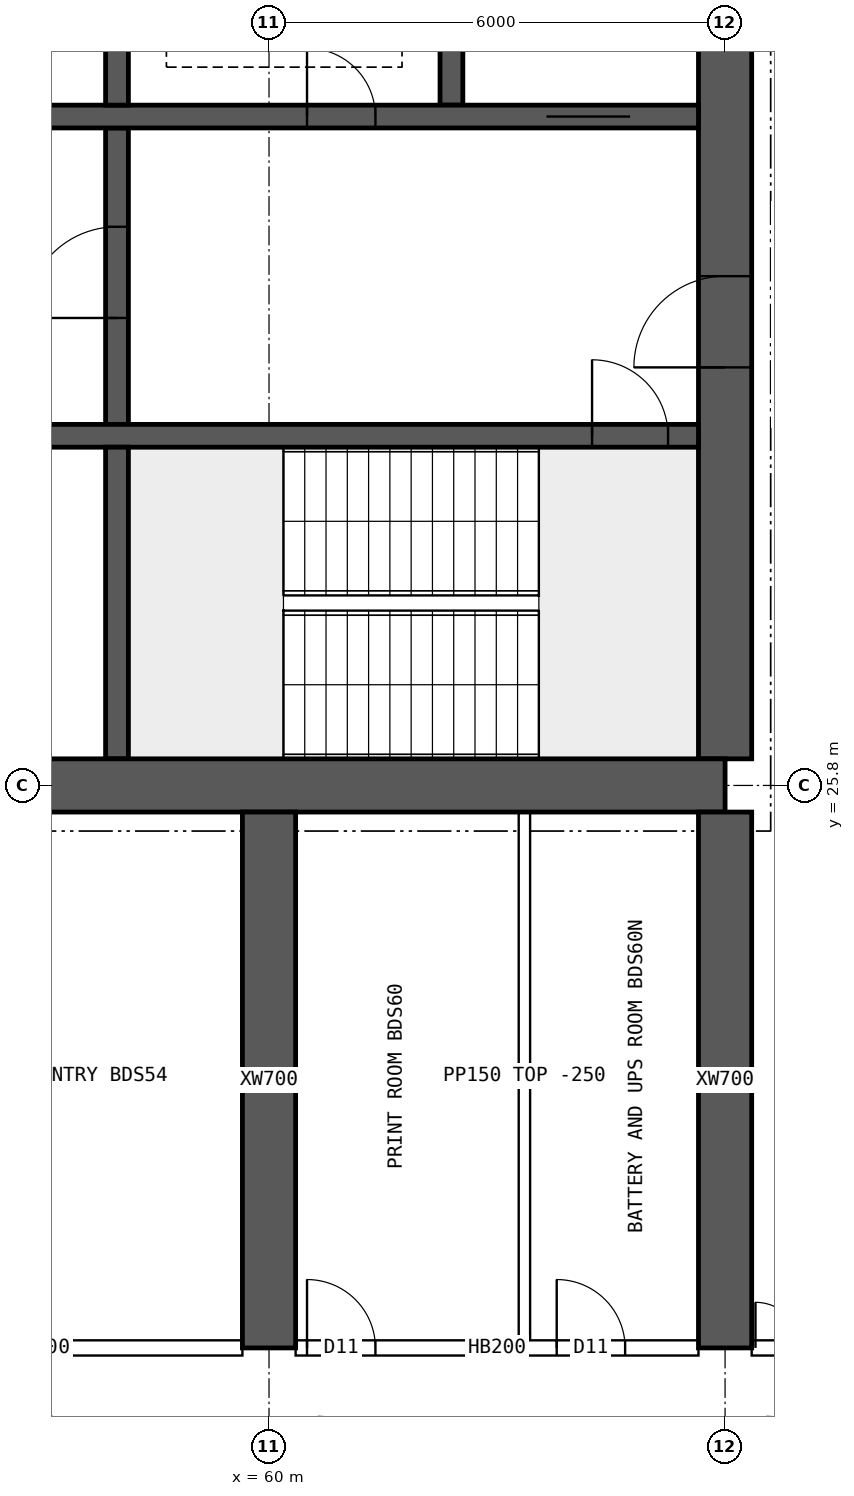
"""IFC4 building model, lengths in metres.
Left out: names, types, materials, properties, quantities, classifications, styles, units other than length and angle.
Written with IfcOpenShell. Run it as: python <this file> out.ifc"""

import sys

from ifc_helpers import new_model, si_unit, direction, frame, frame_2d, origin, place, context, subcontext, project, spatial, rectangle, extrude, element, fill, save


model = new_model("IFC4")
c1 = context("Model", 3, precision=1e-05, world=origin(), true_north=direction((0.0, 1.0)))
c2 = subcontext(c1, "Body", "Model", "MODEL_VIEW")
j1 = project(units=[si_unit("LENGTHUNIT", "METRE"), si_unit("PLANEANGLEUNIT", "RADIAN")], contexts=[c1])
p1 = place(None, origin())
s1 = spatial("IfcSite", under=j1, at=p1, CompositionType="ELEMENT")
p2 = place(p1, origin())
s2 = spatial("IfcBuilding", under=s1, at=p2, CompositionType="ELEMENT")
p3 = place(p2, frame((0.0, 0.0, 208.3)))
s3 = spatial("IfcBuildingStorey", under=s2, at=p3, CompositionType="ELEMENT", Elevation=208.3)
p4 = place(p3, frame((18.0, 25.8, 0.0), z_axis=(0.0, 0.0, 1.0), x_axis=(1.0, 0.0, 0.0)))
e1 = element("IfcWall", 1, at=p4, inside=s3, PredefinedType="SHEAR", context=c2, shape_type="SweptSolid", body=[
    extrude(rectangle(XDim=48.0, YDim=0.7, at=frame_2d((24.0, 0.0))), origin(), (0.0, 0.0, 1.0), 4.5),
])
p5 = place(p3, frame((66.0, 26.15, 0.0), z_axis=(0.0, 0.0, 1.0), x_axis=(0.0, 1.0, 0.0)))
e2 = element("IfcWall", 2, at=p5, inside=s3, PredefinedType="SHEAR", context=c2, shape_type="SweptSolid", body=[
    extrude(rectangle(XDim=11.7, YDim=0.7, at=frame_2d((5.85, 0.0))), origin(), (0.0, 0.0, 1.0), 4.5),
])
p6 = place(p5, frame((5.15, 0.0, 0.0)))
e3 = element("IfcOpeningElement", 3, at=p6, cuts=e2, PredefinedType="OPENING", context=c2, shape_type="SweptSolid", body=[
    extrude(rectangle(XDim=1.2, YDim=2.1, at=frame_2d((0.6, 1.05))), frame((0.0, 0.36, 0.0), z_axis=(0.0, -1.0, 0.0), x_axis=(1.0, 0.0, 0.0)), (0.0, 0.0, 1.0), 0.72),
])
p7 = place(p3, frame((18.35, 30.4, 0.0), z_axis=(0.0, 0.0, 1.0), x_axis=(1.0, 0.0, 0.0)))
e4 = element("IfcWall", 4, at=p7, inside=s3, PredefinedType="SHEAR", context=c2, shape_type="SweptSolid", body=[
    extrude(rectangle(XDim=47.3, YDim=0.3, at=frame_2d((23.65, 0.0))), origin(), (0.0, 0.0, 1.0), 4.5),
])
p8 = place(p7, frame((0.4, 0.0, 0.0)))
e5 = element("IfcOpeningElement", 5, at=p8, cuts=e4, PredefinedType="OPENING", context=c2, shape_type="SweptSolid", body=[
    extrude(rectangle(XDim=1.0, YDim=2.1, at=frame_2d((0.5, 1.05))), frame((0.0, 0.16, 0.0), z_axis=(0.0, -1.0, 0.0), x_axis=(1.0, 0.0, 0.0)), (0.0, 0.0, 1.0), 0.32),
])
p9 = place(p7, frame((45.9, 0.0, 0.0)))
e6 = element("IfcOpeningElement", 6, at=p9, cuts=e4, PredefinedType="OPENING", context=c2, shape_type="SweptSolid", body=[
    extrude(rectangle(XDim=1.0, YDim=2.1, at=frame_2d((0.5, 1.05))), frame((0.0, 0.16, 0.0), z_axis=(0.0, -1.0, 0.0), x_axis=(1.0, 0.0, 0.0)), (0.0, 0.0, 1.0), 0.32),
])
p10 = place(p7, frame((8.4, 0.0, 0.0)))
e7 = element("IfcOpeningElement", 7, at=p10, cuts=e4, PredefinedType="OPENING", context=c2, shape_type="SweptSolid", body=[
    extrude(rectangle(XDim=1.1, YDim=2.1, at=frame_2d((0.55, 1.05))), frame((0.0, 0.16, 0.0), z_axis=(0.0, -1.0, 0.0), x_axis=(1.0, 0.0, 0.0)), (0.0, 0.0, 1.0), 0.32),
])
p11 = place(p7, frame((11.0, 0.0, 0.0)))
e8 = element("IfcOpeningElement", 8, at=p11, cuts=e4, PredefinedType="OPENING", context=c2, shape_type="SweptSolid", body=[
    extrude(rectangle(XDim=1.1, YDim=2.1, at=frame_2d((0.55, 1.05))), frame((0.0, 0.16, 0.0), z_axis=(0.0, -1.0, 0.0), x_axis=(1.0, 0.0, 0.0)), (0.0, 0.0, 1.0), 0.32),
])
p12 = place(p7, frame((13.6, 0.0, 0.0)))
e9 = element("IfcOpeningElement", 9, at=p12, cuts=e4, PredefinedType="OPENING", context=c2, shape_type="SweptSolid", body=[
    extrude(rectangle(XDim=1.1, YDim=2.1, at=frame_2d((0.55, 1.05))), frame((0.0, 0.16, 0.0), z_axis=(0.0, -1.0, 0.0), x_axis=(1.0, 0.0, 0.0)), (0.0, 0.0, 1.0), 0.32),
])
p13 = place(p7, frame((16.2, 0.0, 0.0)))
e10 = element("IfcOpeningElement", 10, at=p13, cuts=e4, PredefinedType="OPENING", context=c2, shape_type="SweptSolid", body=[
    extrude(rectangle(XDim=1.1, YDim=2.1, at=frame_2d((0.55, 1.05))), frame((0.0, 0.16, 0.0), z_axis=(0.0, -1.0, 0.0), x_axis=(1.0, 0.0, 0.0)), (0.0, 0.0, 1.0), 0.32),
])
p14 = place(p7, frame((18.975, 0.0, 0.0)))
e11 = element("IfcOpeningElement", 11, at=p14, cuts=e4, PredefinedType="OPENING", context=c2, shape_type="SweptSolid", body=[
    extrude(rectangle(XDim=0.9, YDim=2.1, at=frame_2d((0.45, 1.05))), frame((0.0, 0.16, 0.0), z_axis=(0.0, -1.0, 0.0), x_axis=(1.0, 0.0, 0.0)), (0.0, 0.0, 1.0), 0.32),
])
p15 = place(p7, frame((24.375, 0.0, 0.0)))
e12 = element("IfcOpeningElement", 12, at=p15, cuts=e4, PredefinedType="OPENING", context=c2, shape_type="SweptSolid", body=[
    extrude(rectangle(XDim=1.1, YDim=2.1, at=frame_2d((0.55, 1.05))), frame((0.0, 0.16, 0.0), z_axis=(0.0, -1.0, 0.0), x_axis=(1.0, 0.0, 0.0)), (0.0, 0.0, 1.0), 0.32),
])
p16 = place(p7, frame((27.125, 0.0, 0.0)))
e13 = element("IfcOpeningElement", 13, at=p16, cuts=e4, PredefinedType="OPENING", context=c2, shape_type="SweptSolid", body=[
    extrude(rectangle(XDim=1.1, YDim=2.1, at=frame_2d((0.55, 1.05))), frame((0.0, 0.16, 0.0), z_axis=(0.0, -1.0, 0.0), x_axis=(1.0, 0.0, 0.0)), (0.0, 0.0, 1.0), 0.32),
])
p17 = place(p7, frame((30.267, 0.0, 0.0)))
e14 = element("IfcOpeningElement", 14, at=p17, cuts=e4, PredefinedType="OPENING", context=c2, shape_type="SweptSolid", body=[
    extrude(rectangle(XDim=1.1, YDim=2.1, at=frame_2d((0.55, 1.05))), frame((0.0, 0.16, 0.0), z_axis=(0.0, -1.0, 0.0), x_axis=(1.0, 0.0, 0.0)), (0.0, 0.0, 1.0), 0.32),
])
p18 = place(p7, frame((33.8, 0.0, 0.0)))
e15 = element("IfcOpeningElement", 15, at=p18, cuts=e4, PredefinedType="OPENING", context=c2, shape_type="SweptSolid", body=[
    extrude(rectangle(XDim=1.1, YDim=2.1, at=frame_2d((0.55, 1.05))), frame((0.0, 0.16, 0.0), z_axis=(0.0, -1.0, 0.0), x_axis=(1.0, 0.0, 0.0)), (0.0, 0.0, 1.0), 0.32),
])
p19 = place(p7, frame((37.333, 0.0, 0.0)))
e16 = element("IfcOpeningElement", 16, at=p19, cuts=e4, PredefinedType="OPENING", context=c2, shape_type="SweptSolid", body=[
    extrude(rectangle(XDim=1.1, YDim=2.1, at=frame_2d((0.55, 1.05))), frame((0.0, 0.16, 0.0), z_axis=(0.0, -1.0, 0.0), x_axis=(1.0, 0.0, 0.0)), (0.0, 0.0, 1.0), 0.32),
])
p20 = place(p3, frame((18.35, 34.6, 0.0), z_axis=(0.0, 0.0, 1.0), x_axis=(1.0, 0.0, 0.0)))
e17 = element("IfcWall", 17, at=p20, inside=s3, PredefinedType="SHEAR", context=c2, shape_type="SweptSolid", body=[
    extrude(rectangle(XDim=47.3, YDim=0.3, at=frame_2d((23.65, 0.0))), origin(), (0.0, 0.0, 1.0), 4.5),
])
p21 = place(p20, frame((0.9, 0.0, 0.0)))
e18 = element("IfcOpeningElement", 18, at=p21, cuts=e17, PredefinedType="OPENING", context=c2, shape_type="SweptSolid", body=[
    extrude(rectangle(XDim=1.1, YDim=2.1, at=frame_2d((0.55, 1.05))), frame((0.0, 0.16, 0.0), z_axis=(0.0, -1.0, 0.0), x_axis=(1.0, 0.0, 0.0)), (0.0, 0.0, 1.0), 0.32),
])
p22 = place(p20, frame((45.3, 0.0, 0.0)))
e19 = element("IfcOpeningElement", 19, at=p22, cuts=e17, PredefinedType="OPENING", context=c2, shape_type="SweptSolid", body=[
    extrude(rectangle(XDim=1.1, YDim=2.1, at=frame_2d((0.55, 1.05))), frame((0.0, 0.16, 0.0), z_axis=(0.0, -1.0, 0.0), x_axis=(1.0, 0.0, 0.0)), (0.0, 0.0, 1.0), 0.32),
])
p23 = place(p20, frame((4.25, 0.0, 0.0)))
e20 = element("IfcOpeningElement", 20, at=p23, cuts=e17, PredefinedType="OPENING", context=c2, shape_type="SweptSolid", body=[
    extrude(rectangle(XDim=0.9, YDim=2.1, at=frame_2d((0.45, 1.05))), frame((0.0, 0.16, 0.0), z_axis=(0.0, -1.0, 0.0), x_axis=(1.0, 0.0, 0.0)), (0.0, 0.0, 1.0), 0.32),
])
p24 = place(p20, frame((42.15, 0.0, 0.0)))
e21 = element("IfcOpeningElement", 21, at=p24, cuts=e17, PredefinedType="OPENING", context=c2, shape_type="SweptSolid", body=[
    extrude(rectangle(XDim=0.9, YDim=2.1, at=frame_2d((0.45, 1.05))), frame((0.0, 0.16, 0.0), z_axis=(0.0, -1.0, 0.0), x_axis=(1.0, 0.0, 0.0)), (0.0, 0.0, 1.0), 0.32),
])
p25 = place(p20, frame((9.025, 0.0, 0.0)))
e22 = element("IfcOpeningElement", 22, at=p25, cuts=e17, PredefinedType="OPENING", context=c2, shape_type="SweptSolid", body=[
    extrude(rectangle(XDim=0.9, YDim=2.1, at=frame_2d((0.45, 1.05))), frame((0.0, 0.16, 0.0), z_axis=(0.0, -1.0, 0.0), x_axis=(1.0, 0.0, 0.0)), (0.0, 0.0, 1.0), 0.32),
])
p26 = place(p20, frame((12.999, 0.0, 0.0)))
e23 = element("IfcOpeningElement", 23, at=p26, cuts=e17, PredefinedType="OPENING", context=c2, shape_type="SweptSolid", body=[
    extrude(rectangle(XDim=0.9, YDim=2.1, at=frame_2d((0.45, 1.05))), frame((0.0, 0.16, 0.0), z_axis=(0.0, -1.0, 0.0), x_axis=(1.0, 0.0, 0.0)), (0.0, 0.0, 1.0), 0.32),
])
p27 = place(p20, frame((16.646, 0.0, 0.0)))
e24 = element("IfcOpeningElement", 24, at=p27, cuts=e17, PredefinedType="OPENING", context=c2, shape_type="SweptSolid", body=[
    extrude(rectangle(XDim=0.9, YDim=2.1, at=frame_2d((0.45, 1.05))), frame((0.0, 0.16, 0.0), z_axis=(0.0, -1.0, 0.0), x_axis=(1.0, 0.0, 0.0)), (0.0, 0.0, 1.0), 0.32),
])
p28 = place(p20, frame((20.405, 0.0, 0.0)))
e25 = element("IfcOpeningElement", 25, at=p28, cuts=e17, PredefinedType="OPENING", context=c2, shape_type="SweptSolid", body=[
    extrude(rectangle(XDim=0.9, YDim=2.1, at=frame_2d((0.45, 1.05))), frame((0.0, 0.16, 0.0), z_axis=(0.0, -1.0, 0.0), x_axis=(1.0, 0.0, 0.0)), (0.0, 0.0, 1.0), 0.32),
])
p29 = place(p20, frame((24.811, 0.0, 0.0)))
e26 = element("IfcOpeningElement", 26, at=p29, cuts=e17, PredefinedType="OPENING", context=c2, shape_type="SweptSolid", body=[
    extrude(rectangle(XDim=0.9, YDim=2.1, at=frame_2d((0.45, 1.05))), frame((0.0, 0.16, 0.0), z_axis=(0.0, -1.0, 0.0), x_axis=(1.0, 0.0, 0.0)), (0.0, 0.0, 1.0), 0.32),
])
p30 = place(p20, frame((27.608, 0.0, 0.0)))
e27 = element("IfcOpeningElement", 27, at=p30, cuts=e17, PredefinedType="OPENING", context=c2, shape_type="SweptSolid", body=[
    extrude(rectangle(XDim=0.9, YDim=2.1, at=frame_2d((0.45, 1.05))), frame((0.0, 0.16, 0.0), z_axis=(0.0, -1.0, 0.0), x_axis=(1.0, 0.0, 0.0)), (0.0, 0.0, 1.0), 0.32),
])
p31 = place(p20, frame((29.981, 0.0, 0.0)))
e28 = element("IfcOpeningElement", 28, at=p31, cuts=e17, PredefinedType="OPENING", context=c2, shape_type="SweptSolid", body=[
    extrude(rectangle(XDim=0.9, YDim=2.1, at=frame_2d((0.45, 1.05))), frame((0.0, 0.16, 0.0), z_axis=(0.0, -1.0, 0.0), x_axis=(1.0, 0.0, 0.0)), (0.0, 0.0, 1.0), 0.32),
])
p32 = place(p20, frame((35.451, 0.0, 0.0)))
e29 = element("IfcOpeningElement", 29, at=p32, cuts=e17, PredefinedType="OPENING", context=c2, shape_type="SweptSolid", body=[
    extrude(rectangle(XDim=0.9, YDim=2.1, at=frame_2d((0.45, 1.05))), frame((0.0, 0.16, 0.0), z_axis=(0.0, -1.0, 0.0), x_axis=(1.0, 0.0, 0.0)), (0.0, 0.0, 1.0), 0.32),
])
p33 = place(p3, frame((58.0, 26.15, 0.0), z_axis=(0.0, 0.0, 1.0), x_axis=(0.0, 1.0, 0.0)))
e30 = element("IfcWall", 30, at=p33, inside=s3, PredefinedType="SHEAR", context=c2, shape_type="SweptSolid", body=[
    extrude(rectangle(XDim=4.1, YDim=0.3, at=frame_2d((2.05, 0.0))), origin(), (0.0, 0.0, 1.0), 4.5),
])
p34 = place(p3, frame((58.0, 30.55, 0.0), z_axis=(0.0, 0.0, 1.0), x_axis=(0.0, 1.0, 0.0)))
e31 = element("IfcWall", 31, at=p34, inside=s3, PredefinedType="SHEAR", context=c2, shape_type="SweptSolid", body=[
    extrude(rectangle(XDim=3.9, YDim=0.3, at=frame_2d((1.95, 0.0))), origin(), (0.0, 0.0, 1.0), 4.5),
])
p35 = place(p34, frame((1.4, 0.0, 0.0)))
e32 = element("IfcOpeningElement", 32, at=p35, cuts=e31, PredefinedType="OPENING", context=c2, shape_type="SweptSolid", body=[
    extrude(rectangle(XDim=1.2, YDim=2.1, at=frame_2d((0.6, 1.05))), frame((0.0, 0.16, 0.0), z_axis=(0.0, -1.0, 0.0), x_axis=(1.0, 0.0, 0.0)), (0.0, 0.0, 1.0), 0.32),
])
for number, where, z_axis, x_axis in (
    (33, (62.4, 34.75, 0.0), (0.0, 0.0, 1.0), (0.0, 1.0, 0.0)),
    (34, (58.0, 34.75, 0.0), (0.0, 0.0, 1.0), (0.0, 1.0, 0.0)),
):
    element("IfcWall", number, at=place(p3, frame(where, z_axis=z_axis, x_axis=x_axis)), inside=s3, PredefinedType="SHEAR", context=c2, shape_type="SweptSolid", body=[
        extrude(rectangle(XDim=3.1, YDim=0.3, at=frame_2d((1.55, 0.0))), origin(), (0.0, 0.0, 1.0), 4.5),
    ])
for number, where, z_axis, x_axis in (
    (35, (60.0, 18.4, 0.0), (0.0, 0.0, 1.0), (0.0, 1.0, 0.0)),
    (36, (66.0, 18.4, 0.0), (0.0, 0.0, 1.0), (0.0, 1.0, 0.0)),
):
    element("IfcWall", number, at=place(p3, frame(where, z_axis=z_axis, x_axis=x_axis)), inside=s3, PredefinedType="SHEAR", context=c2, shape_type="SweptSolid", body=[
        extrude(rectangle(XDim=7.05, YDim=0.7, at=frame_2d((3.525, 0.0))), origin(), (0.0, 0.0, 1.0), 4.5),
    ])
p36 = place(p3, frame((54.35, 18.4, 0.0), z_axis=(0.0, 0.0, 1.0), x_axis=(1.0, 0.0, 0.0)))
e37 = element("IfcWall", 37, at=p36, inside=s3, PredefinedType="SOLIDWALL", context=c2, shape_type="SweptSolid", body=[
    extrude(rectangle(XDim=5.3, YDim=0.2, at=frame_2d((2.65, 0.0))), origin(), (0.0, 0.0, 1.0), 4.25),
])
p37 = place(p36, frame((0.8, 0.0, 0.0)))
e38 = element("IfcOpeningElement", 38, at=p37, cuts=e37, PredefinedType="OPENING", context=c2, shape_type="SweptSolid", body=[
    extrude(rectangle(XDim=1.0, YDim=2.1, at=frame_2d((0.5, 1.05))), frame((0.0, 0.11, 0.0), z_axis=(0.0, -1.0, 0.0), x_axis=(1.0, 0.0, 0.0)), (0.0, 0.0, 1.0), 0.22),
])
p38 = place(p3, frame((60.35, 18.4, 0.0), z_axis=(0.0, 0.0, 1.0), x_axis=(1.0, 0.0, 0.0)))
e39 = element("IfcWall", 39, at=p38, inside=s3, PredefinedType="SOLIDWALL", context=c2, shape_type="SweptSolid", body=[
    extrude(rectangle(XDim=5.3, YDim=0.2, at=frame_2d((2.65, 0.0))), origin(), (0.0, 0.0, 1.0), 4.25),
])
p39 = place(p38, frame((0.15, 0.0, 0.0)))
e40 = element("IfcOpeningElement", 40, at=p39, cuts=e39, PredefinedType="OPENING", context=c2, shape_type="SweptSolid", body=[
    extrude(rectangle(XDim=0.9, YDim=2.1, at=frame_2d((0.45, 1.05))), frame((0.0, 0.11, 0.0), z_axis=(0.0, -1.0, 0.0), x_axis=(1.0, 0.0, 0.0)), (0.0, 0.0, 1.0), 0.22),
])
p40 = place(p38, frame((3.435, 0.0, 0.0)))
e41 = element("IfcOpeningElement", 41, at=p40, cuts=e39, PredefinedType="OPENING", context=c2, shape_type="SweptSolid", body=[
    extrude(rectangle(XDim=0.9, YDim=2.1, at=frame_2d((0.45, 1.05))), frame((0.0, 0.11, 0.0), z_axis=(0.0, -1.0, 0.0), x_axis=(1.0, 0.0, 0.0)), (0.0, 0.0, 1.0), 0.22),
])
p41 = place(p3, frame((66.35, 18.4, 0.0), z_axis=(0.0, 0.0, 1.0), x_axis=(1.0, 0.0, 0.0)))
e42 = element("IfcWall", 42, at=p41, inside=s3, PredefinedType="SOLIDWALL", context=c2, shape_type="SweptSolid", body=[
    extrude(rectangle(XDim=2.05, YDim=0.2, at=frame_2d((1.025, 0.0))), origin(), (0.0, 0.0, 1.0), 4.25),
])
p42 = place(p41, frame((0.05, 0.0, 0.0)))
e43 = element("IfcOpeningElement", 43, at=p42, cuts=e42, PredefinedType="OPENING", context=c2, shape_type="SweptSolid", body=[
    extrude(rectangle(XDim=1.2, YDim=2.1, at=frame_2d((0.6, 1.05))), frame((0.0, 0.11, 0.0), z_axis=(0.0, -1.0, 0.0), x_axis=(1.0, 0.0, 0.0)), (0.0, 0.0, 1.0), 0.22),
])
p43 = place(p3, frame((63.36, 18.5, 0.0), z_axis=(0.0, 0.0, 1.0), x_axis=(0.0, 1.0, 0.0)))
e44 = element("IfcWall", 44, at=p43, inside=s3, PredefinedType="PARTITIONING", context=c2, shape_type="SweptSolid", body=[
    extrude(rectangle(XDim=6.95, YDim=0.15, at=frame_2d((3.475, 0.0))), origin(), (0.0, 0.0, 1.0), 4.25),
])
p44 = place(p6, origin())
e45 = element("IfcDoor", 45, at=p44, inside=s3, OperationType="SINGLE_SWING_LEFT", PredefinedType="DOOR", context=c2, shape_type="SweptSolid", body=[
    extrude(rectangle(XDim=1.2, YDim=2.1, at=frame_2d((0.6, 1.05))), frame((0.0, 0.025, 0.0), z_axis=(0.0, -1.0, 0.0), x_axis=(1.0, 0.0, 0.0)), (0.0, 0.0, 1.0), 0.05),
])
fill(e3, e45)
p45 = place(p9, origin())
e46 = element("IfcDoor", 46, at=p45, inside=s3, OperationType="SINGLE_SWING_LEFT", PredefinedType="DOOR", context=c2, shape_type="SweptSolid", body=[
    extrude(rectangle(XDim=1.0, YDim=2.1, at=frame_2d((0.5, 1.05))), frame((0.0, 0.025, 0.0), z_axis=(0.0, -1.0, 0.0), x_axis=(1.0, 0.0, 0.0)), (0.0, 0.0, 1.0), 0.05),
])
fill(e6, e46)
p46 = place(p22, origin())
e47 = element("IfcDoor", 47, at=p46, inside=s3, OperationType="DOUBLE_DOOR_SLIDING", PredefinedType="DOOR", context=c2, shape_type="SweptSolid", body=[
    extrude(rectangle(XDim=1.1, YDim=2.1, at=frame_2d((0.55, 1.05))), frame((0.0, 0.025, 0.0), z_axis=(0.0, -1.0, 0.0), x_axis=(1.0, 0.0, 0.0)), (0.0, 0.0, 1.0), 0.05),
])
fill(e19, e47)
p47 = place(p24, origin())
e48 = element("IfcDoor", 48, at=p47, inside=s3, OperationType="SINGLE_SWING_LEFT", PredefinedType="DOOR", context=c2, shape_type="SweptSolid", body=[
    extrude(rectangle(XDim=0.9, YDim=2.1, at=frame_2d((0.45, 1.05))), frame((0.0, 0.025, 0.0), z_axis=(0.0, -1.0, 0.0), x_axis=(1.0, 0.0, 0.0)), (0.0, 0.0, 1.0), 0.05),
])
fill(e21, e48)
p48 = place(p35, origin())
e49 = element("IfcDoor", 49, at=p48, inside=s3, OperationType="SINGLE_SWING_LEFT", PredefinedType="DOOR", context=c2, shape_type="SweptSolid", body=[
    extrude(rectangle(XDim=1.2, YDim=2.1, at=frame_2d((0.6, 1.05))), frame((0.0, 0.025, 0.0), z_axis=(0.0, -1.0, 0.0), x_axis=(1.0, 0.0, 0.0)), (0.0, 0.0, 1.0), 0.05),
])
fill(e32, e49)
p49 = place(p42, origin())
e50 = element("IfcDoor", 50, at=p49, inside=s3, OperationType="DOUBLE_DOOR_SINGLE_SWING", PredefinedType="DOOR", context=c2, shape_type="SweptSolid", body=[
    extrude(rectangle(XDim=1.2, YDim=2.1, at=frame_2d((0.6, 1.05))), frame((0.0, 0.025, 0.0), z_axis=(0.0, -1.0, 0.0), x_axis=(1.0, 0.0, 0.0)), (0.0, 0.0, 1.0), 0.05),
])
fill(e43, e50)
p50 = place(p39, origin())
e51 = element("IfcDoor", 51, at=p50, inside=s3, OperationType="SINGLE_SWING_LEFT", PredefinedType="DOOR", context=c2, shape_type="SweptSolid", body=[
    extrude(rectangle(XDim=0.9, YDim=2.1, at=frame_2d((0.45, 1.05))), frame((0.0, 0.025, 0.0), z_axis=(0.0, -1.0, 0.0), x_axis=(1.0, 0.0, 0.0)), (0.0, 0.0, 1.0), 0.05),
])
fill(e40, e51)
p51 = place(p40, origin())
e52 = element("IfcDoor", 52, at=p51, inside=s3, OperationType="SINGLE_SWING_LEFT", PredefinedType="DOOR", context=c2, shape_type="SweptSolid", body=[
    extrude(rectangle(XDim=0.9, YDim=2.1, at=frame_2d((0.45, 1.05))), frame((0.0, 0.025, 0.0), z_axis=(0.0, -1.0, 0.0), x_axis=(1.0, 0.0, 0.0)), (0.0, 0.0, 1.0), 0.05),
])
fill(e41, e52)
save(model, sys.argv[1])
